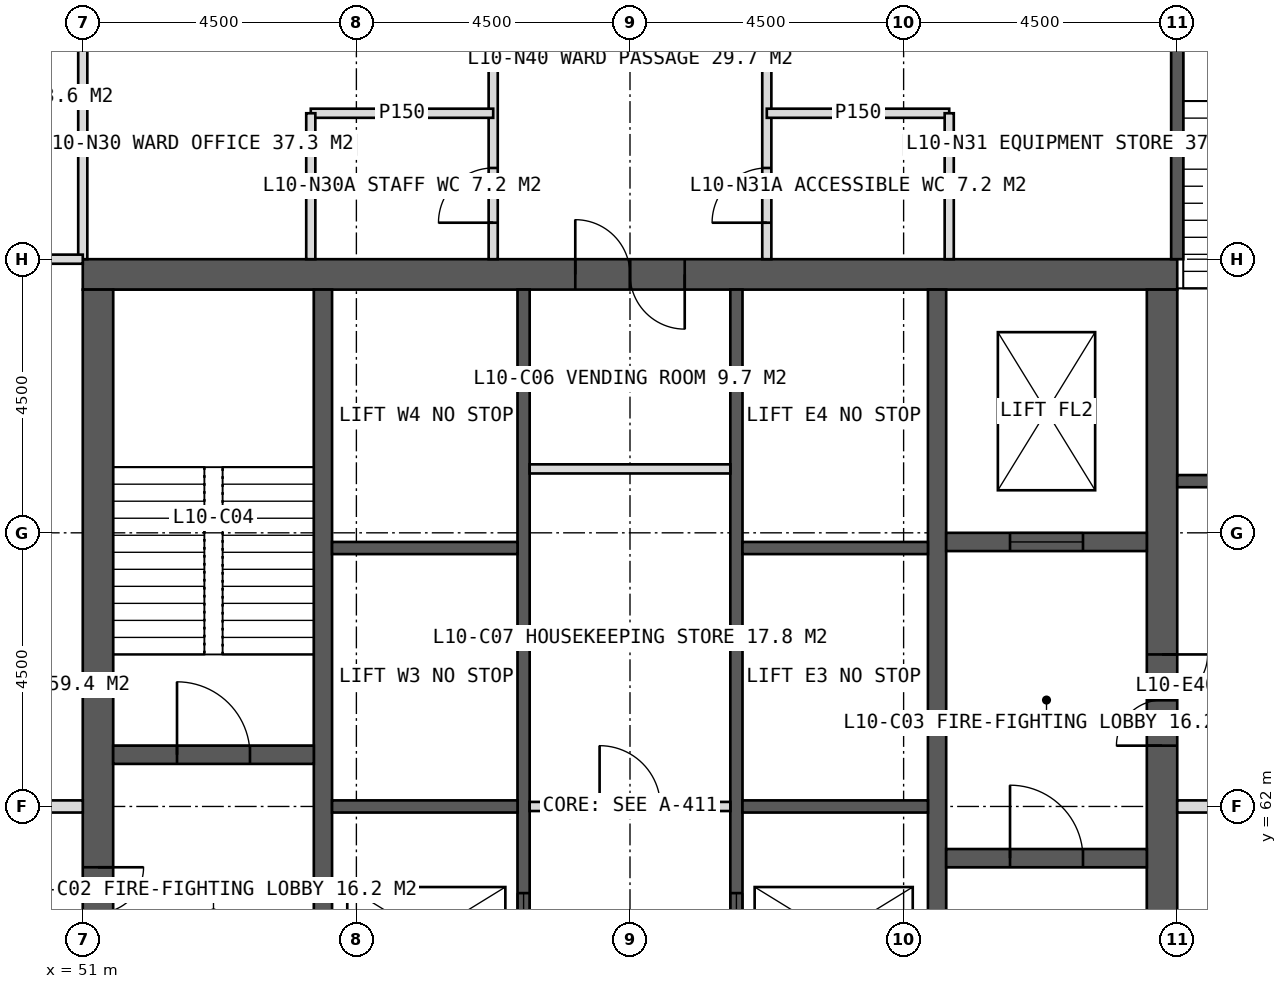
"""IFC4 building model, lengths in metres.
Left out: names, types, materials, properties, quantities, classifications, styles, units other than length and angle.
Written with IfcOpenShell. Run it as: python <this file> out.ifc"""

import sys

from ifc_helpers import new_model, si_unit, direction, frame, frame_2d, origin, place, context, subcontext, project, spatial, rectangle, extrude, element, fill, save


model = new_model("IFC4")
c1 = context("Model", 3, precision=1e-05, world=origin(), true_north=direction((0.0, 1.0)))
c2 = subcontext(c1, "Body", "Model", "MODEL_VIEW")
j1 = project(units=[si_unit("LENGTHUNIT", "METRE"), si_unit("PLANEANGLEUNIT", "RADIAN")], contexts=[c1])
p1 = place(None, origin())
s1 = spatial("IfcSite", under=j1, at=p1, CompositionType="ELEMENT")
p2 = place(p1, origin())
s2 = spatial("IfcBuilding", under=s1, at=p2, CompositionType="ELEMENT")
p3 = place(p2, frame((0.0, 0.0, 47.0)))
s3 = spatial("IfcBuildingStorey", under=s2, at=p3, CompositionType="ELEMENT", Elevation=47.0)
p4 = place(p3, frame((51.0, 70.75, 0.0), z_axis=(0.0, 0.0, 1.0), x_axis=(1.0, 0.0, 0.0)))
e1 = element("IfcWall", 1, at=p4, inside=s3, PredefinedType="SHEAR", context=c2, shape_type="SweptSolid", body=[
    extrude(rectangle(XDim=18.0, YDim=0.5, at=frame_2d((9.0, 0.0))), origin(), (0.0, 0.0, 1.0), 4.0),
])
p5 = place(p4, frame((8.1, 0.0, 0.0)))
e2 = element("IfcOpeningElement", 2, at=p5, cuts=e1, PredefinedType="OPENING", context=c2, shape_type="SweptSolid", body=[
    extrude(rectangle(XDim=1.8, YDim=2.2, at=frame_2d((0.9, 1.1))), frame((0.0, 0.26, 0.0), z_axis=(0.0, -1.0, 0.0), x_axis=(1.0, 0.0, 0.0)), (0.0, 0.0, 1.0), 0.52),
])
p6 = place(p3, frame((51.25, 53.5, 0.0), z_axis=(0.0, 0.0, 1.0), x_axis=(0.0, 1.0, 0.0)))
e3 = element("IfcWall", 3, at=p6, inside=s3, PredefinedType="SHEAR", context=c2, shape_type="SweptSolid", body=[
    extrude(rectangle(XDim=17.0, YDim=0.5, at=frame_2d((8.5, 0.0))), origin(), (0.0, 0.0, 1.0), 4.0),
])
p7 = place(p6, frame((6.0, 0.0, 0.0)))
e4 = element("IfcOpeningElement", 4, at=p7, cuts=e3, PredefinedType="OPENING", context=c2, shape_type="SweptSolid", body=[
    extrude(rectangle(XDim=1.5, YDim=2.2, at=frame_2d((0.75, 1.1))), frame((0.0, 0.26, 0.0), z_axis=(0.0, -1.0, 0.0), x_axis=(1.0, 0.0, 0.0)), (0.0, 0.0, 1.0), 0.52),
])
p8 = place(p3, frame((68.75, 53.5, 0.0), z_axis=(0.0, 0.0, 1.0), x_axis=(0.0, 1.0, 0.0)))
e5 = element("IfcWall", 5, at=p8, inside=s3, PredefinedType="SHEAR", context=c2, shape_type="SweptSolid", body=[
    extrude(rectangle(XDim=17.0, YDim=0.5, at=frame_2d((8.5, 0.0))), origin(), (0.0, 0.0, 1.0), 4.0),
])
p9 = place(p8, frame((9.5, 0.0, 0.0)))
e6 = element("IfcOpeningElement", 6, at=p9, cuts=e5, PredefinedType="OPENING", context=c2, shape_type="SweptSolid", body=[
    extrude(rectangle(XDim=1.5, YDim=2.2, at=frame_2d((0.75, 1.1))), frame((0.0, 0.26, 0.0), z_axis=(0.0, -1.0, 0.0), x_axis=(1.0, 0.0, 0.0)), (0.0, 0.0, 1.0), 0.52),
])
for number, where, z_axis, x_axis in (
    (7, (54.95, 53.5, 0.0), (0.0, 0.0, 1.0), (0.0, 1.0, 0.0)),
    (8, (65.05, 53.5, 0.0), (0.0, 0.0, 1.0), (0.0, 1.0, 0.0)),
):
    element("IfcWall", number, at=place(p3, frame(where, z_axis=z_axis, x_axis=x_axis)), inside=s3, PredefinedType="SHEAR", context=c2, shape_type="SweptSolid", body=[
        extrude(rectangle(XDim=17.0, YDim=0.3, at=frame_2d((8.5, 0.0))), origin(), (0.0, 0.0, 1.0), 4.0),
    ])
p10 = place(p3, frame((58.25, 53.5, 0.0), z_axis=(0.0, 0.0, 1.0), x_axis=(0.0, 1.0, 0.0)))
e9 = element("IfcWall", 9, at=p10, inside=s3, PredefinedType="SHEAR", context=c2, shape_type="SweptSolid", body=[
    extrude(rectangle(XDim=17.0, YDim=0.2, at=frame_2d((8.5, 0.0))), origin(), (0.0, 0.0, 1.0), 4.0),
])
p11 = place(p10, frame((1.375, 0.0, 0.0)))
e10 = element("IfcOpeningElement", 10, at=p11, cuts=e9, PredefinedType="OPENING", context=c2, shape_type="SweptSolid", body=[
    extrude(rectangle(XDim=1.4, YDim=2.2, at=frame_2d((0.7, 1.1))), frame((0.0, 0.11, 0.0), z_axis=(0.0, -1.0, 0.0), x_axis=(1.0, 0.0, 0.0)), (0.0, 0.0, 1.0), 0.22),
])
p12 = place(p10, frame((5.675, 0.0, 0.0)))
e11 = element("IfcOpeningElement", 11, at=p12, cuts=e9, PredefinedType="OPENING", context=c2, shape_type="SweptSolid", body=[
    extrude(rectangle(XDim=1.4, YDim=2.2, at=frame_2d((0.7, 1.1))), frame((0.0, 0.11, 0.0), z_axis=(0.0, -1.0, 0.0), x_axis=(1.0, 0.0, 0.0)), (0.0, 0.0, 1.0), 0.22),
])
p13 = place(p3, frame((61.75, 53.5, 0.0), z_axis=(0.0, 0.0, 1.0), x_axis=(0.0, 1.0, 0.0)))
e12 = element("IfcWall", 12, at=p13, inside=s3, PredefinedType="SHEAR", context=c2, shape_type="SweptSolid", body=[
    extrude(rectangle(XDim=17.0, YDim=0.2, at=frame_2d((8.5, 0.0))), origin(), (0.0, 0.0, 1.0), 4.0),
])
p14 = place(p13, frame((1.375, 0.0, 0.0)))
e13 = element("IfcOpeningElement", 13, at=p14, cuts=e12, PredefinedType="OPENING", context=c2, shape_type="SweptSolid", body=[
    extrude(rectangle(XDim=1.4, YDim=2.2, at=frame_2d((0.7, 1.1))), frame((0.0, 0.11, 0.0), z_axis=(0.0, -1.0, 0.0), x_axis=(1.0, 0.0, 0.0)), (0.0, 0.0, 1.0), 0.22),
])
p15 = place(p13, frame((5.675, 0.0, 0.0)))
e14 = element("IfcOpeningElement", 14, at=p15, cuts=e12, PredefinedType="OPENING", context=c2, shape_type="SweptSolid", body=[
    extrude(rectangle(XDim=1.4, YDim=2.2, at=frame_2d((0.7, 1.1))), frame((0.0, 0.11, 0.0), z_axis=(0.0, -1.0, 0.0), x_axis=(1.0, 0.0, 0.0)), (0.0, 0.0, 1.0), 0.22),
])
for number, where, z_axis, x_axis in (
    (15, (55.1, 62.0, 0.0), (0.0, 0.0, 1.0), (1.0, 0.0, 0.0)),
    (16, (61.85, 62.0, 0.0), (0.0, 0.0, 1.0), (1.0, 0.0, 0.0)),
    (17, (55.1, 66.25, 0.0), (0.0, 0.0, 1.0), (1.0, 0.0, 0.0)),
    (18, (61.85, 66.25, 0.0), (0.0, 0.0, 1.0), (1.0, 0.0, 0.0)),
):
    element("IfcWall", number, at=place(p3, frame(where, z_axis=z_axis, x_axis=x_axis)), inside=s3, PredefinedType="SHEAR", context=c2, shape_type="SweptSolid", body=[
        extrude(rectangle(XDim=3.05, YDim=0.2, at=frame_2d((1.525, 0.0))), origin(), (0.0, 0.0, 1.0), 4.0),
    ])
p16 = place(p3, frame((51.5, 62.85, 0.0), z_axis=(0.0, 0.0, 1.0), x_axis=(1.0, 0.0, 0.0)))
e19 = element("IfcWall", 19, at=p16, inside=s3, PredefinedType="SHEAR", context=c2, shape_type="SweptSolid", body=[
    extrude(rectangle(XDim=3.3, YDim=0.3, at=frame_2d((1.65, 0.0))), origin(), (0.0, 0.0, 1.0), 4.0),
])
p17 = place(p16, frame((1.05, 0.0, 0.0)))
e20 = element("IfcOpeningElement", 20, at=p17, cuts=e19, PredefinedType="OPENING", context=c2, shape_type="SweptSolid", body=[
    extrude(rectangle(XDim=1.2, YDim=2.1, at=frame_2d((0.6, 1.05))), frame((0.0, 0.16, 0.0), z_axis=(0.0, -1.0, 0.0), x_axis=(1.0, 0.0, 0.0)), (0.0, 0.0, 1.0), 0.32),
])
p18 = place(p3, frame((65.2, 61.15, 0.0), z_axis=(0.0, 0.0, 1.0), x_axis=(1.0, 0.0, 0.0)))
e21 = element("IfcWall", 21, at=p18, inside=s3, PredefinedType="SHEAR", context=c2, shape_type="SweptSolid", body=[
    extrude(rectangle(XDim=3.3, YDim=0.3, at=frame_2d((1.65, 0.0))), origin(), (0.0, 0.0, 1.0), 4.0),
])
p19 = place(p18, frame((1.05, 0.0, 0.0)))
e22 = element("IfcOpeningElement", 22, at=p19, cuts=e21, PredefinedType="OPENING", context=c2, shape_type="SweptSolid", body=[
    extrude(rectangle(XDim=1.2, YDim=2.1, at=frame_2d((0.6, 1.05))), frame((0.0, 0.16, 0.0), z_axis=(0.0, -1.0, 0.0), x_axis=(1.0, 0.0, 0.0)), (0.0, 0.0, 1.0), 0.32),
])
p20 = place(p3, frame((65.2, 66.35, 0.0), z_axis=(0.0, 0.0, 1.0), x_axis=(1.0, 0.0, 0.0)))
e23 = element("IfcWall", 23, at=p20, inside=s3, PredefinedType="SHEAR", context=c2, shape_type="SweptSolid", body=[
    extrude(rectangle(XDim=3.3, YDim=0.3, at=frame_2d((1.65, 0.0))), origin(), (0.0, 0.0, 1.0), 4.0),
])
p21 = place(p20, frame((1.05, 0.0, 0.0)))
e24 = element("IfcOpeningElement", 24, at=p21, cuts=e23, PredefinedType="OPENING", context=c2, shape_type="SweptSolid", body=[
    extrude(rectangle(XDim=1.2, YDim=2.2, at=frame_2d((0.6, 1.1))), frame((0.0, 0.16, 0.0), z_axis=(0.0, -1.0, 0.0), x_axis=(1.0, 0.0, 0.0)), (0.0, 0.0, 1.0), 0.32),
])
p22 = place(p3, frame((51.0, 71.0, 0.0), z_axis=(0.0, 0.0, 1.0), x_axis=(0.0, 1.0, 0.0)))
e25 = element("IfcWall", 25, at=p22, inside=s3, PredefinedType="PARTITIONING", context=c2, shape_type="SweptSolid", body=[
    extrude(rectangle(XDim=6.6, YDim=0.15, at=frame_2d((3.3, 0.0))), origin(), (0.0, 0.0, 1.0), 3.75),
])
p23 = place(p3, frame((57.75, 71.0, 0.0), z_axis=(0.0, 0.0, 1.0), x_axis=(0.0, 1.0, 0.0)))
e26 = element("IfcWall", 26, at=p23, inside=s3, PredefinedType="PARTITIONING", context=c2, shape_type="SweptSolid", body=[
    extrude(rectangle(XDim=6.6, YDim=0.15, at=frame_2d((3.3, 0.0))), origin(), (0.0, 0.0, 1.0), 3.75),
])
p24 = place(p23, frame((0.6, 0.0, 0.0)))
e27 = element("IfcOpeningElement", 27, at=p24, cuts=e26, PredefinedType="OPENING", context=c2, shape_type="SweptSolid", body=[
    extrude(rectangle(XDim=0.9, YDim=2.1, at=frame_2d((0.45, 1.05))), frame((0.0, 0.085, 0.0), z_axis=(0.0, -1.0, 0.0), x_axis=(1.0, 0.0, 0.0)), (0.0, 0.0, 1.0), 0.17),
])
p25 = place(p3, frame((62.25, 71.0, 0.0), z_axis=(0.0, 0.0, 1.0), x_axis=(0.0, 1.0, 0.0)))
e28 = element("IfcWall", 28, at=p25, inside=s3, PredefinedType="PARTITIONING", context=c2, shape_type="SweptSolid", body=[
    extrude(rectangle(XDim=6.6, YDim=0.15, at=frame_2d((3.3, 0.0))), origin(), (0.0, 0.0, 1.0), 3.75),
])
p26 = place(p25, frame((0.6, 0.0, 0.0)))
e29 = element("IfcOpeningElement", 29, at=p26, cuts=e28, PredefinedType="OPENING", context=c2, shape_type="SweptSolid", body=[
    extrude(rectangle(XDim=0.9, YDim=2.1, at=frame_2d((0.45, 1.05))), frame((0.0, 0.085, 0.0), z_axis=(0.0, -1.0, 0.0), x_axis=(1.0, 0.0, 0.0)), (0.0, 0.0, 1.0), 0.17),
])
p27 = place(p3, frame((54.75, 73.4, 0.0), z_axis=(0.0, 0.0, 1.0), x_axis=(1.0, 0.0, 0.0)))
e30 = element("IfcWall", 30, at=p27, inside=s3, PredefinedType="PARTITIONING", context=c2, shape_type="SweptSolid", body=[
    extrude(rectangle(XDim=3.0, YDim=0.15, at=frame_2d((1.5, 0.0))), origin(), (0.0, 0.0, 1.0), 3.75),
])
p28 = place(p3, frame((54.75, 71.0, 0.0), z_axis=(0.0, 0.0, 1.0), x_axis=(0.0, 1.0, 0.0)))
e31 = element("IfcWall", 31, at=p28, inside=s3, PredefinedType="PARTITIONING", context=c2, shape_type="SweptSolid", body=[
    extrude(rectangle(XDim=2.4, YDim=0.15, at=frame_2d((1.2, 0.0))), origin(), (0.0, 0.0, 1.0), 3.75),
])
p29 = place(p3, frame((62.25, 73.4, 0.0), z_axis=(0.0, 0.0, 1.0), x_axis=(1.0, 0.0, 0.0)))
e32 = element("IfcWall", 32, at=p29, inside=s3, PredefinedType="PARTITIONING", context=c2, shape_type="SweptSolid", body=[
    extrude(rectangle(XDim=3.0, YDim=0.15, at=frame_2d((1.5, 0.0))), origin(), (0.0, 0.0, 1.0), 3.75),
])
p30 = place(p3, frame((65.25, 71.0, 0.0), z_axis=(0.0, 0.0, 1.0), x_axis=(0.0, 1.0, 0.0)))
e33 = element("IfcWall", 33, at=p30, inside=s3, PredefinedType="PARTITIONING", context=c2, shape_type="SweptSolid", body=[
    extrude(rectangle(XDim=2.4, YDim=0.15, at=frame_2d((1.2, 0.0))), origin(), (0.0, 0.0, 1.0), 3.75),
])
p31 = place(p3, frame((51.0, 62.0, 0.0), z_axis=(0.0, 0.0, 1.0), x_axis=(-1.0, 0.0, 0.0)))
e34 = element("IfcWall", 34, at=p31, inside=s3, PredefinedType="SOLIDWALL", context=c2, shape_type="SweptSolid", body=[
    extrude(rectangle(XDim=6.6, YDim=0.2, at=frame_2d((3.3, 0.0))), origin(), (0.0, 0.0, 1.0), 2.75),
])
p32 = place(p3, frame((51.0, 71.0, 0.0), z_axis=(0.0, 0.0, 1.0), x_axis=(-1.0, 0.0, 0.0)))
e35 = element("IfcWall", 35, at=p32, inside=s3, PredefinedType="PARTITIONING", context=c2, shape_type="SweptSolid", body=[
    extrude(rectangle(XDim=6.6, YDim=0.15, at=frame_2d((3.3, 0.0))), origin(), (0.0, 0.0, 1.0), 3.75),
])
p33 = place(p3, frame((69.0, 62.0, 0.0), z_axis=(0.0, 0.0, 1.0), x_axis=(1.0, 0.0, 0.0)))
e36 = element("IfcWall", 36, at=p33, inside=s3, PredefinedType="SOLIDWALL", context=c2, shape_type="SweptSolid", body=[
    extrude(rectangle(XDim=6.6, YDim=0.2, at=frame_2d((3.3, 0.0))), origin(), (0.0, 0.0, 1.0), 2.75),
])
p34 = place(p3, frame((58.35, 62.0, 0.0), z_axis=(0.0, 0.0, 1.0), x_axis=(1.0, 0.0, 0.0)))
e37 = element("IfcWall", 37, at=p34, inside=s3, PredefinedType="PARTITIONING", context=c2, shape_type="SweptSolid", body=[
    extrude(rectangle(XDim=3.3, YDim=0.15, at=frame_2d((1.65, 0.0))), origin(), (0.0, 0.0, 1.0), 3.75),
])
p35 = place(p34, frame((1.15, 0.0, 0.0)))
e38 = element("IfcOpeningElement", 38, at=p35, cuts=e37, PredefinedType="OPENING", context=c2, shape_type="SweptSolid", body=[
    extrude(rectangle(XDim=1.0, YDim=2.1, at=frame_2d((0.5, 1.05))), frame((0.0, 0.085, 0.0), z_axis=(0.0, -1.0, 0.0), x_axis=(1.0, 0.0, 0.0)), (0.0, 0.0, 1.0), 0.17),
])
p36 = place(p3, frame((58.35, 67.551, 0.0), z_axis=(0.0, 0.0, 1.0), x_axis=(1.0, 0.0, 0.0)))
e39 = element("IfcWall", 39, at=p36, inside=s3, PredefinedType="PARTITIONING", context=c2, shape_type="SweptSolid", body=[
    extrude(rectangle(XDim=3.3, YDim=0.15, at=frame_2d((1.65, 0.0))), origin(), (0.0, 0.0, 1.0), 3.75),
])
p37 = place(p3, frame((69.0, 71.0, 0.0), z_axis=(0.0, 0.0, 1.0), x_axis=(0.0, 1.0, 0.0)))
e40 = element("IfcWall", 40, at=p37, inside=s3, PredefinedType="SOLIDWALL", context=c2, shape_type="SweptSolid", body=[
    extrude(rectangle(XDim=4.1, YDim=0.2, at=frame_2d((2.05, 0.0))), origin(), (0.0, 0.0, 1.0), 3.75),
])
p38 = place(p3, frame((69.0, 67.35, 0.0), z_axis=(0.0, 0.0, 1.0), x_axis=(1.0, 0.0, 0.0)))
e41 = element("IfcWall", 41, at=p38, inside=s3, PredefinedType="SOLIDWALL", context=c2, shape_type="SweptSolid", body=[
    extrude(rectangle(XDim=3.5, YDim=0.2, at=frame_2d((1.75, 0.0))), origin(), (0.0, 0.0, 1.0), 3.75),
])
p39 = place(p24, origin())
e42 = element("IfcDoor", 42, at=p39, inside=s3, OperationType="SINGLE_SWING_LEFT", PredefinedType="DOOR", context=c2, shape_type="SweptSolid", body=[
    extrude(rectangle(XDim=0.9, YDim=2.1, at=frame_2d((0.45, 1.05))), frame((0.0, 0.025, 0.0), z_axis=(0.0, -1.0, 0.0), x_axis=(1.0, 0.0, 0.0)), (0.0, 0.0, 1.0), 0.05),
])
fill(e27, e42)
p40 = place(p26, origin())
e43 = element("IfcDoor", 43, at=p40, inside=s3, OperationType="SINGLE_SWING_LEFT", PredefinedType="DOOR", context=c2, shape_type="SweptSolid", body=[
    extrude(rectangle(XDim=0.9, YDim=2.1, at=frame_2d((0.45, 1.05))), frame((0.0, 0.025, 0.0), z_axis=(0.0, -1.0, 0.0), x_axis=(1.0, 0.0, 0.0)), (0.0, 0.0, 1.0), 0.05),
])
fill(e29, e43)
p41 = place(p7, origin())
e44 = element("IfcDoor", 44, at=p41, inside=s3, OperationType="DOUBLE_DOOR_SINGLE_SWING", PredefinedType="DOOR", context=c2, shape_type="SweptSolid", body=[
    extrude(rectangle(XDim=1.5, YDim=2.2, at=frame_2d((0.75, 1.1))), frame((0.0, 0.025, 0.0), z_axis=(0.0, -1.0, 0.0), x_axis=(1.0, 0.0, 0.0)), (0.0, 0.0, 1.0), 0.05),
])
fill(e4, e44)
p42 = place(p9, origin())
e45 = element("IfcDoor", 45, at=p42, inside=s3, OperationType="DOUBLE_DOOR_SINGLE_SWING", PredefinedType="DOOR", context=c2, shape_type="SweptSolid", body=[
    extrude(rectangle(XDim=1.5, YDim=2.2, at=frame_2d((0.75, 1.1))), frame((0.0, 0.025, 0.0), z_axis=(0.0, -1.0, 0.0), x_axis=(1.0, 0.0, 0.0)), (0.0, 0.0, 1.0), 0.05),
])
fill(e6, e45)
p43 = place(p17, origin())
e46 = element("IfcDoor", 46, at=p43, inside=s3, OperationType="SINGLE_SWING_LEFT", PredefinedType="DOOR", context=c2, shape_type="SweptSolid", body=[
    extrude(rectangle(XDim=1.2, YDim=2.1, at=frame_2d((0.6, 1.05))), frame((0.0, 0.025, 0.0), z_axis=(0.0, -1.0, 0.0), x_axis=(1.0, 0.0, 0.0)), (0.0, 0.0, 1.0), 0.05),
])
fill(e20, e46)
p44 = place(p19, origin())
e47 = element("IfcDoor", 47, at=p44, inside=s3, OperationType="SINGLE_SWING_LEFT", PredefinedType="DOOR", context=c2, shape_type="SweptSolid", body=[
    extrude(rectangle(XDim=1.2, YDim=2.1, at=frame_2d((0.6, 1.05))), frame((0.0, 0.025, 0.0), z_axis=(0.0, -1.0, 0.0), x_axis=(1.0, 0.0, 0.0)), (0.0, 0.0, 1.0), 0.05),
])
fill(e22, e47)
p45 = place(p21, origin())
e48 = element("IfcDoor", 48, at=p45, inside=s3, OperationType="SLIDING_TO_LEFT", PredefinedType="DOOR", context=c2, shape_type="SweptSolid", body=[
    extrude(rectangle(XDim=1.2, YDim=2.2, at=frame_2d((0.6, 1.1))), frame((0.0, 0.025, 0.0), z_axis=(0.0, -1.0, 0.0), x_axis=(1.0, 0.0, 0.0)), (0.0, 0.0, 1.0), 0.05),
])
fill(e24, e48)
p46 = place(p12, origin())
e49 = element("IfcDoor", 49, at=p46, inside=s3, OperationType="SLIDING_TO_LEFT", PredefinedType="DOOR", context=c2, shape_type="SweptSolid", body=[
    extrude(rectangle(XDim=1.4, YDim=2.2, at=frame_2d((0.7, 1.1))), frame((0.0, 0.025, 0.0), z_axis=(0.0, -1.0, 0.0), x_axis=(1.0, 0.0, 0.0)), (0.0, 0.0, 1.0), 0.05),
])
fill(e11, e49)
p47 = place(p15, origin())
e50 = element("IfcDoor", 50, at=p47, inside=s3, OperationType="SLIDING_TO_LEFT", PredefinedType="DOOR", context=c2, shape_type="SweptSolid", body=[
    extrude(rectangle(XDim=1.4, YDim=2.2, at=frame_2d((0.7, 1.1))), frame((0.0, 0.025, 0.0), z_axis=(0.0, -1.0, 0.0), x_axis=(1.0, 0.0, 0.0)), (0.0, 0.0, 1.0), 0.05),
])
fill(e14, e50)
p48 = place(p35, origin())
e51 = element("IfcDoor", 51, at=p48, inside=s3, OperationType="SINGLE_SWING_LEFT", PredefinedType="DOOR", context=c2, shape_type="SweptSolid", body=[
    extrude(rectangle(XDim=1.0, YDim=2.1, at=frame_2d((0.5, 1.05))), frame((0.0, 0.025, 0.0), z_axis=(0.0, -1.0, 0.0), x_axis=(1.0, 0.0, 0.0)), (0.0, 0.0, 1.0), 0.05),
])
fill(e38, e51)
p49 = place(p5, origin())
e52 = element("IfcDoor", 52, at=p49, inside=s3, OperationType="DOUBLE_DOOR_SINGLE_SWING", PredefinedType="DOOR", context=c2, shape_type="SweptSolid", body=[
    extrude(rectangle(XDim=1.8, YDim=2.2, at=frame_2d((0.9, 1.1))), frame((0.0, 0.025, 0.0), z_axis=(0.0, -1.0, 0.0), x_axis=(1.0, 0.0, 0.0)), (0.0, 0.0, 1.0), 0.05),
])
fill(e2, e52)
save(model, sys.argv[1])
